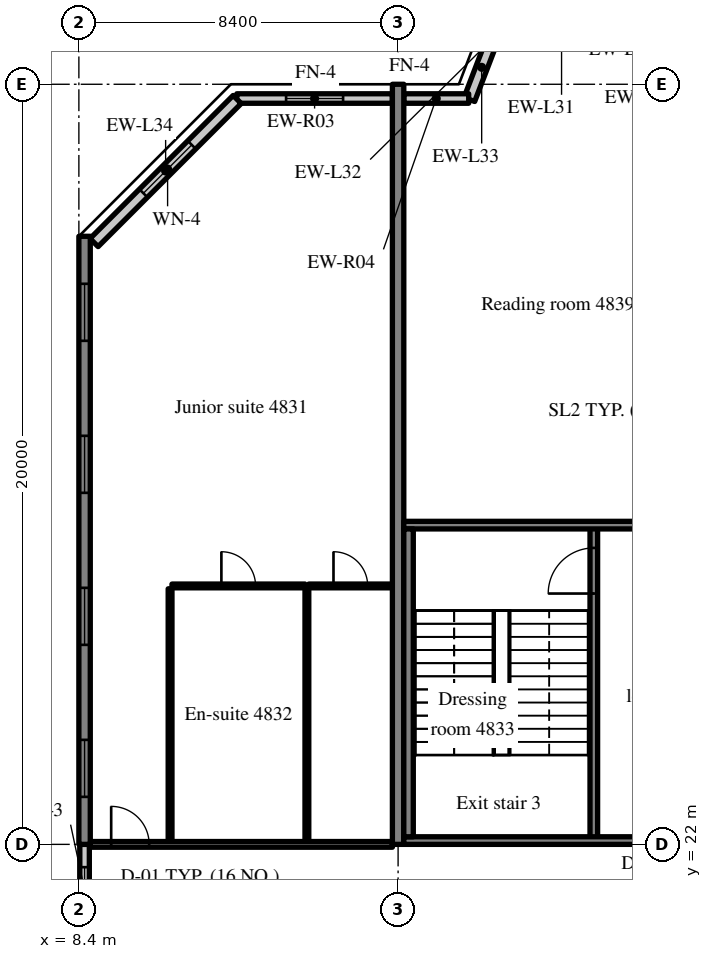
"""IFC4 building model, lengths in metres.
Left out: names, types, materials, properties, quantities, classifications, styles, units other than length and angle.
Written with IfcOpenShell. Run it as: python <this file> out.ifc"""

import sys

from ifc_helpers import new_model, si_unit, direction, frame, frame_2d, origin, place, context, subcontext, project, spatial, rectangle, extrude, source, transform, mapped, element, fill, save


model = new_model("IFC4")
c1 = context("Model", 3, precision=1e-05, world=origin(), true_north=direction((0.0, 1.0)))
c2 = subcontext(c1, "Body", "Model", "MODEL_VIEW")
j1 = project(units=[si_unit("LENGTHUNIT", "METRE"), si_unit("PLANEANGLEUNIT", "RADIAN")], contexts=[c1])
p1 = place(None, origin())
s1 = spatial("IfcSite", under=j1, at=p1, CompositionType="ELEMENT")
p2 = place(p1, origin())
s2 = spatial("IfcBuilding", under=s1, at=p2, CompositionType="ELEMENT")
p3 = place(p2, frame((0.0, 0.0, 197.2)))
s3 = spatial("IfcBuildingStorey", under=s2, at=p3, CompositionType="ELEMENT", Elevation=197.2)
m1 = source(origin(), c2, "Body", "SweptSolid", [
    extrude(rectangle(XDim=16.0, YDim=0.3, at=frame_2d((8.0, 0.0))), origin(), (0.0, 0.0, 1.0), 3.52),
])
p4 = place(p3, frame((8.55, 22.0, 0.0), z_axis=(0.0, 0.0, 1.0), x_axis=(0.0, 1.0, 0.0)))
e1 = element("IfcWall", 1, at=p4, inside=s3, PredefinedType="SHEAR", context=c2, shape_type="MappedRepresentation", body=[
    mapped(m1, transform((0.0, 0.0, 0.0), scale=1.0)),
])
m2 = source(origin(), c2, "Body", "SweptSolid", [
    extrude(rectangle(XDim=1.5, YDim=1.5, at=frame_2d((0.75, 0.75))), frame((0.0, 0.16, 0.0), z_axis=(0.0, -1.0, 0.0), x_axis=(1.0, 0.0, 0.0)), (0.0, 0.0, 1.0), 0.32),
])
p5 = place(p4, frame((1.25, 0.0, 0.9)))
e2 = element("IfcOpeningElement", 2, at=p5, cuts=e1, PredefinedType="OPENING", context=c2, shape_type="MappedRepresentation", body=[
    mapped(m2, transform((0.0, 0.0, 0.0), scale=1.0)),
])
p6 = place(p4, frame((5.25, 0.0, 0.9)))
e3 = element("IfcOpeningElement", 3, at=p6, cuts=e1, PredefinedType="OPENING", context=c2, shape_type="MappedRepresentation", body=[
    mapped(m2, transform((0.0, 0.0, 0.0), scale=1.0)),
])
p7 = place(p4, frame((9.25, 0.0, 0.9)))
e4 = element("IfcOpeningElement", 4, at=p7, cuts=e1, PredefinedType="OPENING", context=c2, shape_type="MappedRepresentation", body=[
    mapped(m2, transform((0.0, 0.0, 0.0), scale=1.0)),
])
p8 = place(p4, frame((13.25, 0.0, 0.9)))
e5 = element("IfcOpeningElement", 5, at=p8, cuts=e1, PredefinedType="OPENING", context=c2, shape_type="MappedRepresentation", body=[
    mapped(m2, transform((0.0, 0.0, 0.0), scale=1.0)),
])
m3 = source(origin(), c2, "Body", "SweptSolid", [
    extrude(rectangle(XDim=20.0, YDim=0.3, at=frame_2d((10.0, 0.0))), origin(), (0.0, 0.0, 1.0), 3.52),
])
p9 = place(p3, frame((16.8, 22.0, 0.0), z_axis=(0.0, 0.0, 1.0), x_axis=(0.0, 1.0, 0.0)))
e6 = element("IfcWall", 6, at=p9, inside=s3, PredefinedType="SHEAR", context=c2, shape_type="MappedRepresentation", body=[
    mapped(m3, transform((0.0, 0.0, 0.0), scale=1.0)),
])
m4 = source(origin(), c2, "Body", "SweptSolid", [
    extrude(rectangle(XDim=1.812, YDim=0.3, at=frame_2d((0.906, 0.0))), origin(), (0.0, 0.0, 1.0), 3.52),
])
p10 = place(p3, frame((19.323, 43.292, 0.0), z_axis=(0.0, 0.0, 1.0), x_axis=(-0.357877270961, -0.93376863244, 0.0)))
e7 = element("IfcWall", 7, at=p10, inside=s3, PredefinedType="SOLIDWALL", context=c2, shape_type="MappedRepresentation", body=[
    mapped(m4, transform((0.0, 0.0, 0.0), scale=1.0)),
])
m5 = source(origin(), c2, "Body", "SweptSolid", [
    extrude(rectangle(XDim=4.094, YDim=0.25, at=frame_2d((2.047, 0.0))), origin(), (0.0, 0.0, 1.0), 2.87),
])
p11 = place(p3, frame((16.65, 41.625, 0.0), z_axis=(0.0, 0.0, 1.0), x_axis=(-1.0, 0.0, 0.0)))
e8 = element("IfcWall", 8, at=p11, inside=s3, PredefinedType="SOLIDWALL", context=c2, shape_type="MappedRepresentation", body=[
    mapped(m5, transform((0.0, 0.0, 0.0), scale=1.0)),
])
m6 = source(origin(), c2, "Body", "SweptSolid", [
    extrude(rectangle(XDim=1.5, YDim=1.5, at=frame_2d((0.75, 0.75))), frame((0.0, 0.135, 0.0), z_axis=(0.0, -1.0, 0.0), x_axis=(1.0, 0.0, 0.0)), (0.0, 0.0, 1.0), 0.27),
])
p12 = place(p11, frame((1.297, 0.0, 0.9)))
e9 = element("IfcOpeningElement", 9, at=p12, cuts=e8, PredefinedType="OPENING", context=c2, shape_type="MappedRepresentation", body=[
    mapped(m6, transform((0.0, 0.0, 0.0), scale=1.0)),
])
m7 = source(origin(), c2, "Body", "SweptSolid", [
    extrude(rectangle(XDim=1.708, YDim=0.25, at=frame_2d((0.854, 0.0))), origin(), (0.0, 0.0, 1.0), 2.87),
])
p13 = place(p3, frame((18.658, 41.625, 0.0), z_axis=(0.0, 0.0, 1.0), x_axis=(-1.0, 0.0, 0.0)))
e10 = element("IfcWall", 10, at=p13, inside=s3, PredefinedType="SOLIDWALL", context=c2, shape_type="MappedRepresentation", body=[
    mapped(m7, transform((0.0, 0.0, 0.0), scale=1.0)),
])
m8 = source(origin(), c2, "Body", "SweptSolid", [
    extrude(rectangle(XDim=5.326, YDim=0.3, at=frame_2d((2.663, 0.0))), origin(), (0.0, 0.0, 1.0), 3.52),
])
p14 = place(p3, frame((12.566, 41.6, 0.0), z_axis=(0.0, 0.0, 1.0), x_axis=(-0.707083859269, -0.707129702361, 0.0)))
e11 = element("IfcWall", 11, at=p14, inside=s3, PredefinedType="SOLIDWALL", context=c2, shape_type="MappedRepresentation", body=[
    mapped(m8, transform((0.0, 0.0, 0.0), scale=1.0)),
])
m9 = source(origin(), c2, "Body", "SweptSolid", [
    extrude(rectangle(XDim=1.8, YDim=1.5, at=frame_2d((0.9, 0.75))), frame((0.0, 0.16, 0.0), z_axis=(0.0, -1.0, 0.0), x_axis=(1.0, 0.0, 0.0)), (0.0, 0.0, 1.0), 0.32),
])
p15 = place(p14, frame((1.689, 0.0, 0.9)))
e12 = element("IfcOpeningElement", 12, at=p15, cuts=e11, PredefinedType="OPENING", context=c2, shape_type="MappedRepresentation", body=[
    mapped(m9, transform((0.0, 0.0, 0.0), scale=1.0)),
])
m10 = source(origin(), c2, "Body", "SweptSolid", [
    extrude(rectangle(XDim=2.4, YDim=0.25, at=frame_2d((1.2, 0.0))), origin(), (0.0, 0.0, 1.0), 2.62),
])
p16 = place(p3, frame((8.55, 19.6, 0.0), z_axis=(0.0, 0.0, 1.0), x_axis=(0.0, 1.0, 0.0)))
e13 = element("IfcWall", 13, at=p16, inside=s3, PredefinedType="SOLIDWALL", context=c2, shape_type="MappedRepresentation", body=[
    mapped(m10, transform((0.0, 0.0, 0.0), scale=1.0)),
])
m11 = source(origin(), c2, "Body", "SweptSolid", [
    extrude(rectangle(XDim=1.2, YDim=1.5, at=frame_2d((0.6, 0.75))), frame((0.0, 0.135, 0.0), z_axis=(0.0, -1.0, 0.0), x_axis=(1.0, 0.0, 0.0)), (0.0, 0.0, 1.0), 0.27),
])
p17 = place(p16, frame((0.6, 0.0, 0.9)))
e14 = element("IfcOpeningElement", 14, at=p17, cuts=e13, PredefinedType="OPENING", context=c2, shape_type="MappedRepresentation", body=[
    mapped(m11, transform((0.0, 0.0, 0.0), scale=1.0)),
])
m12 = source(origin(), c2, "Body", "SweptSolid", [
    extrude(rectangle(XDim=8.3, YDim=0.2, at=frame_2d((4.15, 0.0))), origin(), (0.0, 0.0, 1.0), 3.52),
])
p18 = place(p3, frame((21.95, 22.1, 0.0), z_axis=(0.0, 0.0, 1.0), x_axis=(0.0, 1.0, 0.0)))
e15 = element("IfcWall", 15, at=p18, inside=s3, PredefinedType="SOLIDWALL", context=c2, shape_type="MappedRepresentation", body=[
    mapped(m12, transform((0.0, 0.0, 0.0), scale=1.0)),
])
m13 = source(origin(), c2, "Body", "SweptSolid", [
    extrude(rectangle(XDim=1.2, YDim=2.1, at=frame_2d((0.6, 1.05))), frame((0.0, 0.11, 0.0), z_axis=(0.0, -1.0, 0.0), x_axis=(1.0, 0.0, 0.0)), (0.0, 0.0, 1.0), 0.22),
])
p19 = place(p18, frame((6.5, 0.0, 0.0)))
e16 = element("IfcOpeningElement", 16, at=p19, cuts=e15, PredefinedType="OPENING", context=c2, shape_type="MappedRepresentation", body=[
    mapped(m13, transform((0.0, 0.0, 0.0), scale=1.0)),
])
m14 = source(origin(), c2, "Body", "SweptSolid", [
    extrude(rectangle(XDim=8.25, YDim=0.2, at=frame_2d((4.125, 0.0))), origin(), (0.0, 0.0, 1.0), 3.52),
])
p20 = place(p3, frame((16.95, 22.1, 0.0), z_axis=(0.0, 0.0, 1.0), x_axis=(1.0, 0.0, 0.0)))
e17 = element("IfcWall", 17, at=p20, inside=s3, PredefinedType="SOLIDWALL", context=c2, shape_type="MappedRepresentation", body=[
    mapped(m14, transform((0.0, 0.0, 0.0), scale=1.0)),
])
p21 = place(p20, frame((6.05, 0.0, 0.0)))
e18 = element("IfcOpeningElement", 18, at=p21, cuts=e17, PredefinedType="OPENING", context=c2, shape_type="MappedRepresentation", body=[
    mapped(m13, transform((0.0, 0.0, 0.0), scale=1.0)),
])
p22 = place(p3, frame((16.95, 30.4, 0.0), z_axis=(0.0, 0.0, 1.0), x_axis=(1.0, 0.0, 0.0)))
e19 = element("IfcWall", 19, at=p22, inside=s3, PredefinedType="SOLIDWALL", context=c2, shape_type="MappedRepresentation", body=[
    mapped(m14, transform((0.0, 0.0, 0.0), scale=1.0)),
])
m15 = source(origin(), c2, "Body", "SweptSolid", [
    extrude(rectangle(XDim=1.0, YDim=2.1, at=frame_2d((0.5, 1.05))), frame((0.0, 0.11, 0.0), z_axis=(0.0, -1.0, 0.0), x_axis=(1.0, 0.0, 0.0)), (0.0, 0.0, 1.0), 0.22),
])
p23 = place(p22, frame((6.15, 0.0, 0.0)))
e20 = element("IfcOpeningElement", 20, at=p23, cuts=e19, PredefinedType="OPENING", context=c2, shape_type="MappedRepresentation", body=[
    mapped(m15, transform((0.0, 0.0, 0.0), scale=1.0)),
])
m16 = source(origin(), c2, "Body", "SweptSolid", [
    extrude(rectangle(XDim=8.1, YDim=0.25, at=frame_2d((4.05, 0.0))), origin(), (0.0, 0.0, 1.0), 3.52),
])
p24 = place(p3, frame((17.075, 22.2, 0.0), z_axis=(0.0, 0.0, 1.0), x_axis=(0.0, 1.0, 0.0)))
e21 = element("IfcWall", 21, at=p24, inside=s3, PredefinedType="SOLIDWALL", context=c2, shape_type="MappedRepresentation", body=[
    mapped(m16, transform((0.0, 0.0, 0.0), scale=1.0)),
])
m17 = source(origin(), c2, "Body", "SweptSolid", [
    extrude(rectangle(XDim=6.65, YDim=0.1, at=frame_2d((3.325, 0.0))), origin(), (0.0, 0.0, 1.0), 3.52),
])
for number, where, z_axis, x_axis in (
    (22, (10.8, 22.075, 0.0), (0.0, 0.0, 1.0), (0.0, 1.0, 0.0)),
    (23, (14.4, 22.075, 0.0), (0.0, 0.0, 1.0), (0.0, 1.0, 0.0)),
):
    element("IfcWall", number, at=place(p3, frame(where, z_axis=z_axis, x_axis=x_axis)), inside=s3, PredefinedType="PARTITIONING", context=c2, shape_type="MappedRepresentation", body=[
        mapped(m17, transform((0.0, 0.0, 0.0), scale=1.0)),
    ])
m18 = source(origin(), c2, "Body", "SweptSolid", [
    extrude(rectangle(XDim=3.5, YDim=0.1, at=frame_2d((1.75, 0.0))), origin(), (0.0, 0.0, 1.0), 3.52),
])
p25 = place(p3, frame((10.85, 28.8, 0.0), z_axis=(0.0, 0.0, 1.0), x_axis=(1.0, 0.0, 0.0)))
e24 = element("IfcWall", 24, at=p25, inside=s3, PredefinedType="PARTITIONING", context=c2, shape_type="MappedRepresentation", body=[
    mapped(m18, transform((0.0, 0.0, 0.0), scale=1.0)),
])
m19 = source(origin(), c2, "Body", "SweptSolid", [
    extrude(rectangle(XDim=0.9, YDim=2.1, at=frame_2d((0.45, 1.05))), frame((0.0, 0.06, 0.0), z_axis=(0.0, -1.0, 0.0), x_axis=(1.0, 0.0, 0.0)), (0.0, 0.0, 1.0), 0.12),
])
p26 = place(p25, frame((1.3, 0.0, 0.0)))
e25 = element("IfcOpeningElement", 25, at=p26, cuts=e24, PredefinedType="OPENING", context=c2, shape_type="MappedRepresentation", body=[
    mapped(m19, transform((0.0, 0.0, 0.0), scale=1.0)),
])
m20 = source(origin(), c2, "Body", "SweptSolid", [
    extrude(rectangle(XDim=2.2, YDim=0.1, at=frame_2d((1.1, 0.0))), origin(), (0.0, 0.0, 1.0), 3.52),
])
p27 = place(p3, frame((14.45, 28.8, 0.0), z_axis=(0.0, 0.0, 1.0), x_axis=(1.0, 0.0, 0.0)))
e26 = element("IfcWall", 26, at=p27, inside=s3, PredefinedType="PARTITIONING", context=c2, shape_type="MappedRepresentation", body=[
    mapped(m20, transform((0.0, 0.0, 0.0), scale=1.0)),
])
p28 = place(p27, frame((0.65, 0.0, 0.0)))
e27 = element("IfcOpeningElement", 27, at=p28, cuts=e26, PredefinedType="OPENING", context=c2, shape_type="MappedRepresentation", body=[
    mapped(m19, transform((0.0, 0.0, 0.0), scale=1.0)),
])
m21 = source(origin(), c2, "Body", "SweptSolid", [
    extrude(rectangle(XDim=7.95, YDim=0.15, at=frame_2d((3.975, 0.0))), origin(), (0.0, 0.0, 1.0), 2.82),
])
p29 = place(p3, frame((8.7, 22.0, 0.0), z_axis=(0.0, 0.0, 1.0), x_axis=(1.0, 0.0, 0.0)))
e28 = element("IfcWall", 28, at=p29, inside=s3, PredefinedType="PARTITIONING", context=c2, shape_type="MappedRepresentation", body=[
    mapped(m21, transform((0.0, 0.0, 0.0), scale=1.0)),
])
m22 = source(origin(), c2, "Body", "SweptSolid", [
    extrude(rectangle(XDim=1.0, YDim=2.1, at=frame_2d((0.5, 1.05))), frame((0.0, 0.085, 0.0), z_axis=(0.0, -1.0, 0.0), x_axis=(1.0, 0.0, 0.0)), (0.0, 0.0, 1.0), 0.17),
])
p30 = place(p29, frame((0.55, 0.0, 0.0)))
e29 = element("IfcOpeningElement", 29, at=p30, cuts=e28, PredefinedType="OPENING", context=c2, shape_type="MappedRepresentation", body=[
    mapped(m22, transform((0.0, 0.0, 0.0), scale=1.0)),
])
m23 = source(origin(), c2, "Body", "SweptSolid", [
    extrude(rectangle(XDim=1.5, YDim=1.5, at=frame_2d((0.75, 0.75))), frame((0.0, 0.03, 0.0), z_axis=(0.0, -1.0, 0.0), x_axis=(1.0, 0.0, 0.0)), (0.0, 0.0, 1.0), 0.06),
])
p31 = place(p12, origin())
e30 = element("IfcWindow", 30, at=p31, inside=s3, PartitioningType="SINGLE_PANEL", PredefinedType="WINDOW", context=c2, shape_type="MappedRepresentation", body=[
    mapped(m23, transform((0.0, 0.0, 0.0), scale=1.0)),
])
fill(e9, e30)
m24 = source(origin(), c2, "Body", "SweptSolid", [
    extrude(rectangle(XDim=1.8, YDim=1.5, at=frame_2d((0.9, 0.75))), frame((0.0, 0.03, 0.0), z_axis=(0.0, -1.0, 0.0), x_axis=(1.0, 0.0, 0.0)), (0.0, 0.0, 1.0), 0.06),
])
p32 = place(p15, origin())
e31 = element("IfcWindow", 31, at=p32, inside=s3, PartitioningType="SINGLE_PANEL", PredefinedType="WINDOW", context=c2, shape_type="MappedRepresentation", body=[
    mapped(m24, transform((0.0, 0.0, 0.0), scale=1.0)),
])
fill(e12, e31)
p33 = place(p5, origin())
e32 = element("IfcWindow", 32, at=p33, inside=s3, PartitioningType="SINGLE_PANEL", PredefinedType="WINDOW", context=c2, shape_type="MappedRepresentation", body=[
    mapped(m23, transform((0.0, 0.0, 0.0), scale=1.0)),
])
fill(e2, e32)
p34 = place(p6, origin())
e33 = element("IfcWindow", 33, at=p34, inside=s3, PartitioningType="SINGLE_PANEL", PredefinedType="WINDOW", context=c2, shape_type="MappedRepresentation", body=[
    mapped(m23, transform((0.0, 0.0, 0.0), scale=1.0)),
])
fill(e3, e33)
p35 = place(p7, origin())
e34 = element("IfcWindow", 34, at=p35, inside=s3, PartitioningType="SINGLE_PANEL", PredefinedType="WINDOW", context=c2, shape_type="MappedRepresentation", body=[
    mapped(m23, transform((0.0, 0.0, 0.0), scale=1.0)),
])
fill(e4, e34)
p36 = place(p8, origin())
e35 = element("IfcWindow", 35, at=p36, inside=s3, PartitioningType="SINGLE_PANEL", PredefinedType="WINDOW", context=c2, shape_type="MappedRepresentation", body=[
    mapped(m23, transform((0.0, 0.0, 0.0), scale=1.0)),
])
fill(e5, e35)
m25 = source(origin(), c2, "Body", "SweptSolid", [
    extrude(rectangle(XDim=1.2, YDim=1.5, at=frame_2d((0.6, 0.75))), frame((0.0, 0.03, 0.0), z_axis=(0.0, -1.0, 0.0), x_axis=(1.0, 0.0, 0.0)), (0.0, 0.0, 1.0), 0.06),
])
p37 = place(p17, origin())
e36 = element("IfcWindow", 36, at=p37, inside=s3, PartitioningType="SINGLE_PANEL", PredefinedType="WINDOW", context=c2, shape_type="MappedRepresentation", body=[
    mapped(m25, transform((0.0, 0.0, 0.0), scale=1.0)),
])
fill(e14, e36)
m26 = source(origin(), c2, "Body", "SweptSolid", [
    extrude(rectangle(XDim=1.2, YDim=2.1, at=frame_2d((0.6, 1.05))), frame((0.0, 0.025, 0.0), z_axis=(0.0, -1.0, 0.0), x_axis=(1.0, 0.0, 0.0)), (0.0, 0.0, 1.0), 0.05),
])
p38 = place(p19, origin())
e37 = element("IfcDoor", 37, at=p38, inside=s3, OperationType="SINGLE_SWING_LEFT", PredefinedType="DOOR", context=c2, shape_type="MappedRepresentation", body=[
    mapped(m26, transform((0.0, 0.0, 0.0), scale=1.0)),
])
fill(e16, e37)
m27 = source(origin(), c2, "Body", "SweptSolid", [
    extrude(rectangle(XDim=0.9, YDim=2.1, at=frame_2d((0.45, 1.05))), frame((0.0, 0.025, 0.0), z_axis=(0.0, -1.0, 0.0), x_axis=(1.0, 0.0, 0.0)), (0.0, 0.0, 1.0), 0.05),
])
p39 = place(p26, origin())
e38 = element("IfcDoor", 38, at=p39, inside=s3, OperationType="SINGLE_SWING_LEFT", PredefinedType="DOOR", context=c2, shape_type="MappedRepresentation", body=[
    mapped(m27, transform((0.0, 0.0, 0.0), scale=1.0)),
])
fill(e25, e38)
p40 = place(p28, origin())
e39 = element("IfcDoor", 39, at=p40, inside=s3, OperationType="SINGLE_SWING_LEFT", PredefinedType="DOOR", context=c2, shape_type="MappedRepresentation", body=[
    mapped(m27, transform((0.0, 0.0, 0.0), scale=1.0)),
])
fill(e27, e39)
m28 = source(origin(), c2, "Body", "SweptSolid", [
    extrude(rectangle(XDim=1.0, YDim=2.1, at=frame_2d((0.5, 1.05))), frame((0.0, 0.025, 0.0), z_axis=(0.0, -1.0, 0.0), x_axis=(1.0, 0.0, 0.0)), (0.0, 0.0, 1.0), 0.05),
])
p41 = place(p30, origin())
e40 = element("IfcDoor", 40, at=p41, inside=s3, OperationType="SINGLE_SWING_LEFT", PredefinedType="DOOR", context=c2, shape_type="MappedRepresentation", body=[
    mapped(m28, transform((0.0, 0.0, 0.0), scale=1.0)),
])
fill(e29, e40)
save(model, sys.argv[1])
